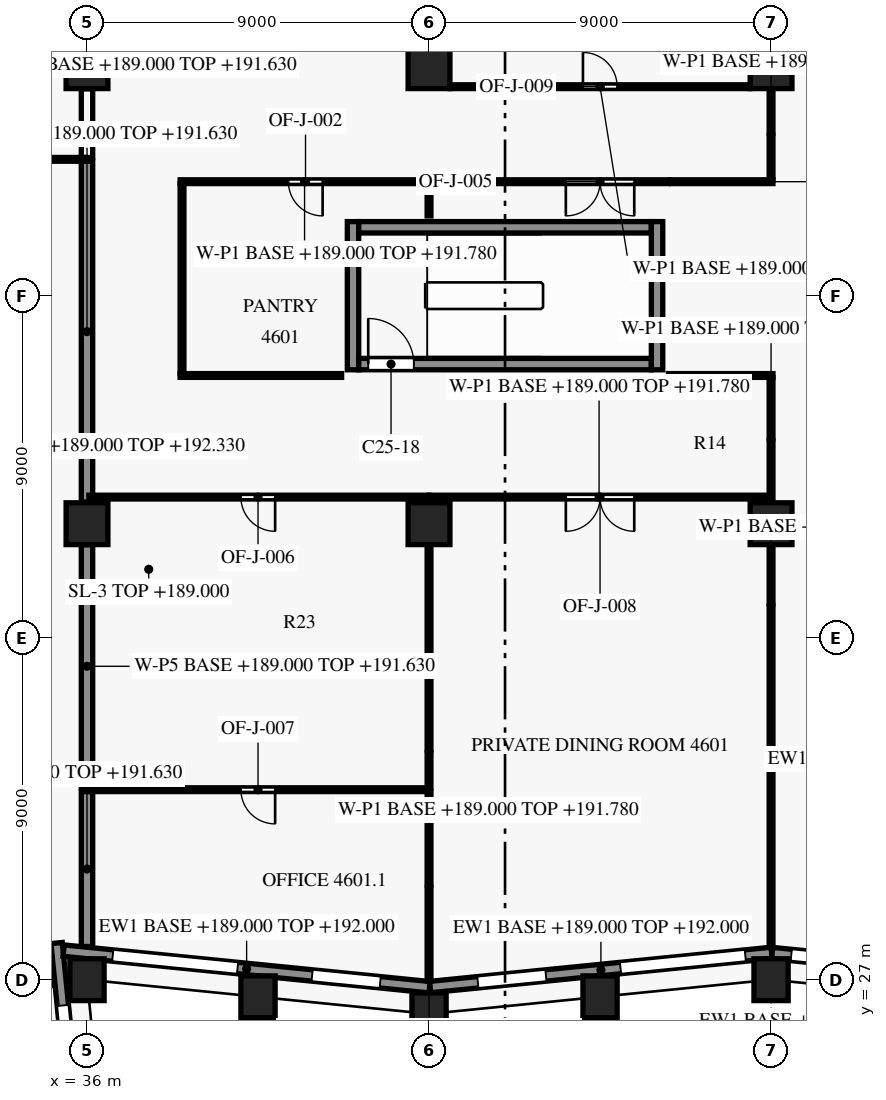
"""IFC4 building model, lengths in metres.
Left out: names, types, materials, properties, quantities, classifications, styles, units other than length and angle.
Written with IfcOpenShell. Run it as: python <this file> out.ifc"""

import sys

from ifc_helpers import new_model, si_unit, direction, frame, frame_2d, origin, origin_2d, place, context, subcontext, project, spatial, rectangle, extrude, element, fill, save


model = new_model("IFC4")
c1 = context("Model", 3, precision=1e-05, world=origin(), true_north=direction((0.0, 1.0)))
c2 = subcontext(c1, "Body", "Model", "MODEL_VIEW")
j1 = project(units=[si_unit("LENGTHUNIT", "METRE"), si_unit("PLANEANGLEUNIT", "RADIAN")], contexts=[c1])
p1 = place(None, origin())
s1 = spatial("IfcSite", under=j1, at=p1, CompositionType="ELEMENT")
p2 = place(p1, origin())
s2 = spatial("IfcBuilding", under=s1, at=p2, CompositionType="ELEMENT")
p3 = place(p2, frame((0.0, 0.0, 189.0)))
s3 = spatial("IfcBuildingStorey", under=s2, at=p3, CompositionType="ELEMENT", Elevation=189.0)
for number, where, z_axis, x_axis in (
    (1, (36.0, 27.0, 0.0), (0.0, 0.0, 1.0), (-0.1, 0.995, 0.0)),
    (2, (40.5, 26.55, 0.0), (0.0, 0.0, 1.0), (0.995, -0.1, 0.0)),
    (3, (45.0, 26.1, 0.0), (0.0, 0.0, 1.0), (1.0, 0.0, 0.0)),
    (4, (49.5, 26.55, 0.0), (0.0, 0.0, 1.0), (0.995, 0.1, 0.0)),
    (5, (54.0, 27.0, 0.0), (0.0, 0.0, 1.0), (1.0, 0.0, 0.0)),
):
    element("IfcColumn", number, at=place(p3, frame(where, z_axis=z_axis, x_axis=x_axis)), inside=s3, PredefinedType="COLUMN", context=c2, shape_type="SweptSolid", body=[
        extrude(rectangle(XDim=0.9, YDim=1.1, at=origin_2d()), origin(), (0.0, 0.0, 1.0), 3.8),
    ])
for number, where, z_axis, x_axis in (
    (6, (36.0, 39.0, 0.0), (0.0, 0.0, 1.0), (1.0, 0.0, 0.0)),
    (7, (36.0, 51.0, 0.0), (0.0, 0.0, 1.0), (1.0, 0.0, 0.0)),
    (8, (45.0, 39.0, 0.0), (0.0, 0.0, 1.0), (1.0, 0.0, 0.0)),
    (9, (45.0, 51.0, 0.0), (0.0, 0.0, 1.0), (1.0, 0.0, 0.0)),
    (10, (54.0, 39.0, 0.0), (0.0, 0.0, 1.0), (1.0, 0.0, 0.0)),
    (11, (54.0, 51.0, 0.0), (0.0, 0.0, 1.0), (1.0, 0.0, 0.0)),
):
    element("IfcColumn", number, at=place(p3, frame(where, z_axis=z_axis, x_axis=x_axis)), inside=s3, PredefinedType="COLUMN", context=c2, shape_type="SweptSolid", body=[
        extrude(rectangle(XDim=1.1, YDim=1.1, at=origin_2d()), origin(), (0.0, 0.0, 1.0), 3.8),
    ])
p4 = place(p3, frame((35.2, 27.964, 0.0), z_axis=(0.0, 0.0, 1.0), x_axis=(0.099501297882, -0.995037432321, 0.0)))
e12 = element("IfcWall", 12, at=p4, inside=s3, PredefinedType="SOLIDWALL", context=c2, shape_type="SweptSolid", body=[
    extrude(rectangle(XDim=9.984, YDim=0.3, at=frame_2d((4.992, 0.0))), origin(), (0.0, 0.0, 1.0), 3.0),
])
p5 = place(p4, frame((1.65, 0.0, 0.15)))
e13 = element("IfcOpeningElement", 13, at=p5, cuts=e12, PredefinedType="OPENING", context=c2, shape_type="SweptSolid", body=[
    extrude(rectangle(XDim=3.3, YDim=2.4, at=frame_2d((1.65, 1.2))), frame((0.0, 0.16, 0.0), z_axis=(0.0, -1.0, 0.0), x_axis=(1.0, 0.0, 0.0)), (0.0, 0.0, 1.0), 0.32),
])
p6 = place(p4, frame((6.923, 0.0, 0.75)))
e14 = element("IfcOpeningElement", 14, at=p6, cuts=e12, PredefinedType="OPENING", context=c2, shape_type="SweptSolid", body=[
    extrude(rectangle(XDim=1.8, YDim=1.8, at=frame_2d((0.9, 0.9))), frame((0.0, 0.16, 0.0), z_axis=(0.0, -1.0, 0.0), x_axis=(1.0, 0.0, 0.0)), (0.0, 0.0, 1.0), 0.32),
])
p7 = place(p3, frame((45.015, 26.802, 0.0), z_axis=(0.0, 0.0, 1.0), x_axis=(-0.995037689759, 0.099498723402, 0.0)))
e15 = element("IfcWall", 15, at=p7, inside=s3, PredefinedType="SOLIDWALL", context=c2, shape_type="SweptSolid", body=[
    extrude(rectangle(XDim=9.677, YDim=0.3, at=frame_2d((4.839, 0.0))), origin(), (0.0, 0.0, 1.0), 3.0),
])
p8 = place(p7, frame((1.306, 0.0, 0.75)))
e16 = element("IfcOpeningElement", 16, at=p8, cuts=e15, PredefinedType="OPENING", context=c2, shape_type="SweptSolid", body=[
    extrude(rectangle(XDim=1.8, YDim=1.8, at=frame_2d((0.9, 0.9))), frame((0.0, 0.16, 0.0), z_axis=(0.0, -1.0, 0.0), x_axis=(1.0, 0.0, 0.0)), (0.0, 0.0, 1.0), 0.32),
])
p9 = place(p7, frame((5.079, 0.0, 0.15)))
e17 = element("IfcOpeningElement", 17, at=p9, cuts=e15, PredefinedType="OPENING", context=c2, shape_type="SweptSolid", body=[
    extrude(rectangle(XDim=3.3, YDim=2.4, at=frame_2d((1.65, 1.2))), frame((0.0, 0.16, 0.0), z_axis=(0.0, -1.0, 0.0), x_axis=(1.0, 0.0, 0.0)), (0.0, 0.0, 1.0), 0.32),
])
p10 = place(p3, frame((54.015, 27.705, 0.0), z_axis=(0.0, 0.0, 1.0), x_axis=(-0.995035316196, -0.099522457379, 0.0)))
e18 = element("IfcWall", 18, at=p10, inside=s3, PredefinedType="SOLIDWALL", context=c2, shape_type="SweptSolid", body=[
    extrude(rectangle(XDim=9.03, YDim=0.3, at=frame_2d((4.515, 0.0))), origin(), (0.0, 0.0, 1.0), 3.0),
])
p11 = place(p10, frame((0.696, 0.0, 0.15)))
e19 = element("IfcOpeningElement", 19, at=p11, cuts=e18, PredefinedType="OPENING", context=c2, shape_type="SweptSolid", body=[
    extrude(rectangle(XDim=3.3, YDim=2.4, at=frame_2d((1.65, 1.2))), frame((0.0, 0.16, 0.0), z_axis=(0.0, -1.0, 0.0), x_axis=(1.0, 0.0, 0.0)), (0.0, 0.0, 1.0), 0.32),
])
p12 = place(p10, frame((5.969, 0.0, 0.75)))
e20 = element("IfcOpeningElement", 20, at=p12, cuts=e18, PredefinedType="OPENING", context=c2, shape_type="SweptSolid", body=[
    extrude(rectangle(XDim=1.8, YDim=1.8, at=frame_2d((0.9, 0.9))), frame((0.0, 0.16, 0.0), z_axis=(0.0, -1.0, 0.0), x_axis=(1.0, 0.0, 0.0)), (0.0, 0.0, 1.0), 0.32),
])
p13 = place(p3, frame((57.965, 27.307, 0.0), z_axis=(0.0, 0.0, 1.0), x_axis=(-0.99503596767, 0.099515943658, 0.0)))
e21 = element("IfcWall", 21, at=p13, inside=s3, PredefinedType="SOLIDWALL", context=c2, shape_type="SweptSolid", body=[
    extrude(rectangle(XDim=3.955, YDim=0.3, at=frame_2d((1.977, 0.0))), origin(), (0.0, 0.0, 1.0), 3.0),
])
p14 = place(p13, frame((0.15, 0.0, 0.15)))
e22 = element("IfcOpeningElement", 22, at=p14, cuts=e21, PredefinedType="OPENING", context=c2, shape_type="SweptSolid", body=[
    extrude(rectangle(XDim=3.3, YDim=2.4, at=frame_2d((1.65, 1.2))), frame((0.0, 0.16, 0.0), z_axis=(0.0, -1.0, 0.0), x_axis=(1.0, 0.0, 0.0)), (0.0, 0.0, 1.0), 0.32),
])
p15 = place(p3, frame((43.15, 43.2, 0.0), z_axis=(0.0, 0.0, 1.0), x_axis=(1.0, 0.0, 0.0)))
e23 = element("IfcWall", 23, at=p15, inside=s3, PredefinedType="SHEAR", context=c2, shape_type="SweptSolid", body=[
    extrude(rectangle(XDim=7.7, YDim=0.3, at=frame_2d((3.85, 0.0))), origin(), (0.0, 0.0, 1.0), 3.5),
])
p16 = place(p15, frame((0.25, 0.0, 0.0)))
e24 = element("IfcOpeningElement", 24, at=p16, cuts=e23, PredefinedType="OPENING", context=c2, shape_type="SweptSolid", body=[
    extrude(rectangle(XDim=1.2, YDim=2.2, at=frame_2d((0.6, 1.1))), frame((0.0, 0.16, 0.0), z_axis=(0.0, -1.0, 0.0), x_axis=(1.0, 0.0, 0.0)), (0.0, 0.0, 1.0), 0.32),
])
p17 = place(p3, frame((43.15, 46.8, 0.0), z_axis=(0.0, 0.0, 1.0), x_axis=(1.0, 0.0, 0.0)))
e25 = element("IfcWall", 25, at=p17, inside=s3, PredefinedType="SHEAR", context=c2, shape_type="SweptSolid", body=[
    extrude(rectangle(XDim=7.7, YDim=0.3, at=frame_2d((3.85, 0.0))), origin(), (0.0, 0.0, 1.0), 3.5),
])
for number, where, z_axis, x_axis in (
    (26, (43.0, 43.05, 0.0), (0.0, 0.0, 1.0), (0.0, 1.0, 0.0)),
    (27, (51.0, 43.05, 0.0), (0.0, 0.0, 1.0), (0.0, 1.0, 0.0)),
):
    element("IfcWall", number, at=place(p3, frame(where, z_axis=z_axis, x_axis=x_axis)), inside=s3, PredefinedType="SHEAR", context=c2, shape_type="SweptSolid", body=[
        extrude(rectangle(XDim=3.9, YDim=0.3, at=frame_2d((1.95, 0.0))), origin(), (0.0, 0.0, 1.0), 3.5),
    ])
p18 = place(p3, frame((24.555, 27.0, 0.0), z_axis=(0.0, 0.0, 1.0), x_axis=(1.0, 0.0, 0.0)))
e28 = element("IfcWall", 28, at=p18, inside=s3, PredefinedType="PARTITIONING", context=c2, shape_type="SweptSolid", body=[
    extrude(rectangle(XDim=10.571, YDim=0.3, at=frame_2d((5.285, 0.0))), origin(), (0.0, 0.0, 1.0), 2.63),
])
p19 = place(p3, frame((54.0, 27.874, 0.0), z_axis=(0.0, 0.0, 1.0), x_axis=(0.0, 1.0, 0.0)))
e29 = element("IfcWall", 29, at=p19, inside=s3, PredefinedType="PARTITIONING", context=c2, shape_type="SweptSolid", body=[
    extrude(rectangle(XDim=10.571, YDim=0.1, at=frame_2d((5.285, 0.0))), origin(), (0.0, 0.0, 1.0), 2.78),
])
p20 = place(p3, frame((36.0, 27.874, 0.0), z_axis=(0.0, 0.0, 1.0), x_axis=(0.0, 1.0, 0.0)))
e30 = element("IfcWall", 30, at=p20, inside=s3, PredefinedType="PARTITIONING", context=c2, shape_type="SweptSolid", body=[
    extrude(rectangle(XDim=4.076, YDim=0.3, at=frame_2d((2.038, 0.0))), origin(), (0.0, 0.0, 1.0), 2.63),
])
p21 = place(p3, frame((45.0, 31.95, 0.0), z_axis=(0.0, 0.0, 1.0), x_axis=(0.0, -1.0, 0.0)))
e31 = element("IfcWall", 31, at=p21, inside=s3, PredefinedType="PARTITIONING", context=c2, shape_type="SweptSolid", body=[
    extrude(rectangle(XDim=4.976, YDim=0.1, at=frame_2d((2.488, 0.0))), origin(), (0.0, 0.0, 1.0), 2.78),
])
p22 = place(p3, frame((44.95, 32.0, 0.0), z_axis=(0.0, 0.0, 1.0), x_axis=(-1.0, 0.0, 0.0)))
e32 = element("IfcWall", 32, at=p22, inside=s3, PredefinedType="PARTITIONING", context=c2, shape_type="SweptSolid", body=[
    extrude(rectangle(XDim=8.9, YDim=0.1, at=frame_2d((4.45, 0.0))), origin(), (0.0, 0.0, 1.0), 2.63),
])
p23 = place(p22, frame((4.0, 0.0, 0.0)))
e33 = element("IfcOpeningElement", 33, at=p23, cuts=e32, PredefinedType="OPENING", context=c2, shape_type="SweptSolid", body=[
    extrude(rectangle(XDim=0.9, YDim=2.1, at=frame_2d((0.45, 1.05))), frame((0.0, 0.06, 0.0), z_axis=(0.0, -1.0, 0.0), x_axis=(1.0, 0.0, 0.0)), (0.0, 0.0, 1.0), 0.12),
])
p24 = place(p3, frame((36.0, 32.05, 0.0), z_axis=(0.0, 0.0, 1.0), x_axis=(0.0, 1.0, 0.0)))
e34 = element("IfcWall", 34, at=p24, inside=s3, PredefinedType="PARTITIONING", context=c2, shape_type="SweptSolid", body=[
    extrude(rectangle(XDim=6.395, YDim=0.3, at=frame_2d((3.198, 0.0))), origin(), (0.0, 0.0, 1.0), 2.63),
])
p25 = place(p3, frame((45.0, 38.445, 0.0), z_axis=(0.0, 0.0, 1.0), x_axis=(0.0, -1.0, 0.0)))
e35 = element("IfcWall", 35, at=p25, inside=s3, PredefinedType="PARTITIONING", context=c2, shape_type="SweptSolid", body=[
    extrude(rectangle(XDim=6.395, YDim=0.1, at=frame_2d((3.198, 0.0))), origin(), (0.0, 0.0, 1.0), 2.78),
])
p26 = place(p3, frame((45.0, 39.7, 0.0), z_axis=(0.0, 0.0, 1.0), x_axis=(-1.0, 0.0, 0.0)))
e36 = element("IfcWall", 36, at=p26, inside=s3, PredefinedType="PARTITIONING", context=c2, shape_type="SweptSolid", body=[
    extrude(rectangle(XDim=8.95, YDim=0.1, at=frame_2d((4.475, 0.0))), origin(), (0.0, 0.0, 1.0), 2.63),
])
p27 = place(p26, frame((4.05, 0.0, 0.0)))
e37 = element("IfcOpeningElement", 37, at=p27, cuts=e36, PredefinedType="OPENING", context=c2, shape_type="SweptSolid", body=[
    extrude(rectangle(XDim=0.9, YDim=2.1, at=frame_2d((0.45, 1.05))), frame((0.0, 0.06, 0.0), z_axis=(0.0, -1.0, 0.0), x_axis=(1.0, 0.0, 0.0)), (0.0, 0.0, 1.0), 0.12),
])
p28 = place(p3, frame((53.95, 39.7, 0.0), z_axis=(0.0, 0.0, 1.0), x_axis=(-1.0, 0.0, 0.0)))
e38 = element("IfcWall", 38, at=p28, inside=s3, PredefinedType="PARTITIONING", context=c2, shape_type="SweptSolid", body=[
    extrude(rectangle(XDim=8.95, YDim=0.1, at=frame_2d((4.475, 0.0))), origin(), (0.0, 0.0, 1.0), 2.78),
])
p29 = place(p28, frame((3.55, 0.0, 0.0)))
e39 = element("IfcOpeningElement", 39, at=p29, cuts=e38, PredefinedType="OPENING", context=c2, shape_type="SweptSolid", body=[
    extrude(rectangle(XDim=1.8, YDim=2.1, at=frame_2d((0.9, 1.05))), frame((0.0, 0.06, 0.0), z_axis=(0.0, -1.0, 0.0), x_axis=(1.0, 0.0, 0.0)), (0.0, 0.0, 1.0), 0.12),
])
p30 = place(p3, frame((36.0, 39.57, 0.0), z_axis=(0.0, 0.0, 1.0), x_axis=(0.0, 1.0, 0.0)))
e40 = element("IfcWall", 40, at=p30, inside=s3, PredefinedType="PARTITIONING", context=c2, shape_type="SweptSolid", body=[
    extrude(rectangle(XDim=8.968, YDim=0.3, at=frame_2d((4.484, 0.0))), origin(), (0.0, 0.0, 1.0), 2.63),
])
p31 = place(p3, frame((54.0, 42.85, 0.0), z_axis=(0.0, 0.0, 1.0), x_axis=(0.0, -1.0, 0.0)))
e41 = element("IfcWall", 41, at=p31, inside=s3, PredefinedType="PARTITIONING", context=c2, shape_type="SweptSolid", body=[
    extrude(rectangle(XDim=3.28, YDim=0.1, at=frame_2d((1.64, 0.0))), origin(), (0.0, 0.0, 1.0), 2.78),
])
p32 = place(p3, frame((38.45, 42.9, 0.0), z_axis=(0.0, 0.0, 1.0), x_axis=(1.0, 0.0, 0.0)))
e42 = element("IfcWall", 42, at=p32, inside=s3, PredefinedType="PARTITIONING", context=c2, shape_type="SweptSolid", body=[
    extrude(rectangle(XDim=4.25, YDim=0.1, at=frame_2d((2.125, 0.0))), origin(), (0.0, 0.0, 1.0), 2.63),
])
p33 = place(p3, frame((51.3, 42.9, 0.0), z_axis=(0.0, 0.0, 1.0), x_axis=(1.0, 0.0, 0.0)))
e43 = element("IfcWall", 43, at=p33, inside=s3, PredefinedType="PARTITIONING", context=c2, shape_type="SweptSolid", body=[
    extrude(rectangle(XDim=2.75, YDim=0.1, at=frame_2d((1.375, 0.0))), origin(), (0.0, 0.0, 1.0), 2.63),
])
p34 = place(p3, frame((38.5, 47.95, 0.0), z_axis=(0.0, 0.0, 1.0), x_axis=(0.0, -1.0, 0.0)))
e44 = element("IfcWall", 44, at=p34, inside=s3, PredefinedType="PARTITIONING", context=c2, shape_type="SweptSolid", body=[
    extrude(rectangle(XDim=5.0, YDim=0.1, at=frame_2d((2.5, 0.0))), origin(), (0.0, 0.0, 1.0), 2.63),
])
p35 = place(p3, frame((45.0, 47.95, 0.0), z_axis=(0.0, 0.0, 1.0), x_axis=(0.0, -1.0, 0.0)))
e45 = element("IfcWall", 45, at=p35, inside=s3, PredefinedType="PARTITIONING", context=c2, shape_type="SweptSolid", body=[
    extrude(rectangle(XDim=0.85, YDim=0.1, at=frame_2d((0.425, 0.0))), origin(), (0.0, 0.0, 1.0), 2.63),
])
p36 = place(p3, frame((45.0, 48.0, 0.0), z_axis=(0.0, 0.0, 1.0), x_axis=(-1.0, 0.0, 0.0)))
e46 = element("IfcWall", 46, at=p36, inside=s3, PredefinedType="PARTITIONING", context=c2, shape_type="SweptSolid", body=[
    extrude(rectangle(XDim=6.55, YDim=0.1, at=frame_2d((3.275, 0.0))), origin(), (0.0, 0.0, 1.0), 2.78),
])
p37 = place(p36, frame((2.8, 0.0, 0.0)))
e47 = element("IfcOpeningElement", 47, at=p37, cuts=e46, PredefinedType="OPENING", context=c2, shape_type="SweptSolid", body=[
    extrude(rectangle(XDim=0.9, YDim=2.1, at=frame_2d((0.45, 1.05))), frame((0.0, 0.06, 0.0), z_axis=(0.0, -1.0, 0.0), x_axis=(1.0, 0.0, 0.0)), (0.0, 0.0, 1.0), 0.12),
])
p38 = place(p3, frame((54.05, 48.0, 0.0), z_axis=(0.0, 0.0, 1.0), x_axis=(-1.0, 0.0, 0.0)))
e48 = element("IfcWall", 48, at=p38, inside=s3, PredefinedType="PARTITIONING", context=c2, shape_type="SweptSolid", body=[
    extrude(rectangle(XDim=9.05, YDim=0.1, at=frame_2d((4.525, 0.0))), origin(), (0.0, 0.0, 1.0), 2.78),
])
p39 = place(p38, frame((3.65, 0.0, 0.0)))
e49 = element("IfcOpeningElement", 49, at=p39, cuts=e48, PredefinedType="OPENING", context=c2, shape_type="SweptSolid", body=[
    extrude(rectangle(XDim=1.8, YDim=2.1, at=frame_2d((0.9, 1.05))), frame((0.0, 0.06, 0.0), z_axis=(0.0, -1.0, 0.0), x_axis=(1.0, 0.0, 0.0)), (0.0, 0.0, 1.0), 0.12),
])
p40 = place(p3, frame((31.05, 48.588, 0.0), z_axis=(0.0, 0.0, 1.0), x_axis=(1.0, 0.0, 0.0)))
e50 = element("IfcWall", 50, at=p40, inside=s3, PredefinedType="PARTITIONING", context=c2, shape_type="SweptSolid", body=[
    extrude(rectangle(XDim=4.9, YDim=0.1, at=frame_2d((2.45, 0.0))), origin(), (0.0, 0.0, 1.0), 2.63),
])
p41 = place(p3, frame((36.0, 48.638, 0.0), z_axis=(0.0, 0.0, 1.0), x_axis=(0.0, 1.0, 0.0)))
e51 = element("IfcWall", 51, at=p41, inside=s3, PredefinedType="PARTITIONING", context=c2, shape_type="SweptSolid", body=[
    extrude(rectangle(XDim=1.807, YDim=0.3, at=frame_2d((0.904, 0.0))), origin(), (0.0, 0.0, 1.0), 2.63),
])
p42 = place(p3, frame((54.0, 50.445, 0.0), z_axis=(0.0, 0.0, 1.0), x_axis=(0.0, -1.0, 0.0)))
e52 = element("IfcWall", 52, at=p42, inside=s3, PredefinedType="PARTITIONING", context=c2, shape_type="SweptSolid", body=[
    extrude(rectangle(XDim=2.395, YDim=0.1, at=frame_2d((1.198, 0.0))), origin(), (0.0, 0.0, 1.0), 2.78),
])
p43 = place(p3, frame((45.555, 50.5, 0.0), z_axis=(0.0, 0.0, 1.0), x_axis=(1.0, 0.0, 0.0)))
e53 = element("IfcWall", 53, at=p43, inside=s3, PredefinedType="PARTITIONING", context=c2, shape_type="SweptSolid", body=[
    extrude(rectangle(XDim=7.89, YDim=0.1, at=frame_2d((3.945, 0.0))), origin(), (0.0, 0.0, 1.0), 3.33),
])
p44 = place(p43, frame((3.495, 0.0, 0.0)))
e54 = element("IfcOpeningElement", 54, at=p44, cuts=e53, PredefinedType="OPENING", context=c2, shape_type="SweptSolid", body=[
    extrude(rectangle(XDim=0.9, YDim=2.1, at=frame_2d((0.45, 1.05))), frame((0.0, 0.06, 0.0), z_axis=(0.0, -1.0, 0.0), x_axis=(1.0, 0.0, 0.0)), (0.0, 0.0, 1.0), 0.12),
])
p45 = place(p5, origin())
e55 = element("IfcWindow", 55, at=p45, inside=s3, PartitioningType="SINGLE_PANEL", PredefinedType="WINDOW", context=c2, shape_type="SweptSolid", body=[
    extrude(rectangle(XDim=3.3, YDim=2.4, at=frame_2d((1.65, 1.2))), frame((0.0, 0.03, 0.0), z_axis=(0.0, -1.0, 0.0), x_axis=(1.0, 0.0, 0.0)), (0.0, 0.0, 1.0), 0.06),
])
fill(e13, e55)
p46 = place(p8, origin())
e56 = element("IfcWindow", 56, at=p46, inside=s3, PartitioningType="SINGLE_PANEL", PredefinedType="WINDOW", context=c2, shape_type="SweptSolid", body=[
    extrude(rectangle(XDim=1.8, YDim=1.8, at=frame_2d((0.9, 0.9))), frame((0.0, 0.03, 0.0), z_axis=(0.0, -1.0, 0.0), x_axis=(1.0, 0.0, 0.0)), (0.0, 0.0, 1.0), 0.06),
])
fill(e16, e56)
p47 = place(p9, origin())
e57 = element("IfcWindow", 57, at=p47, inside=s3, PartitioningType="SINGLE_PANEL", PredefinedType="WINDOW", context=c2, shape_type="SweptSolid", body=[
    extrude(rectangle(XDim=3.3, YDim=2.4, at=frame_2d((1.65, 1.2))), frame((0.0, 0.03, 0.0), z_axis=(0.0, -1.0, 0.0), x_axis=(1.0, 0.0, 0.0)), (0.0, 0.0, 1.0), 0.06),
])
fill(e17, e57)
p48 = place(p11, origin())
e58 = element("IfcWindow", 58, at=p48, inside=s3, PartitioningType="SINGLE_PANEL", PredefinedType="WINDOW", context=c2, shape_type="SweptSolid", body=[
    extrude(rectangle(XDim=3.3, YDim=2.4, at=frame_2d((1.65, 1.2))), frame((0.0, 0.03, 0.0), z_axis=(0.0, -1.0, 0.0), x_axis=(1.0, 0.0, 0.0)), (0.0, 0.0, 1.0), 0.06),
])
fill(e19, e58)
p49 = place(p12, origin())
e59 = element("IfcWindow", 59, at=p49, inside=s3, PartitioningType="SINGLE_PANEL", PredefinedType="WINDOW", context=c2, shape_type="SweptSolid", body=[
    extrude(rectangle(XDim=1.8, YDim=1.8, at=frame_2d((0.9, 0.9))), frame((0.0, 0.03, 0.0), z_axis=(0.0, -1.0, 0.0), x_axis=(1.0, 0.0, 0.0)), (0.0, 0.0, 1.0), 0.06),
])
fill(e20, e59)
p50 = place(p14, origin())
e60 = element("IfcWindow", 60, at=p50, inside=s3, PartitioningType="SINGLE_PANEL", PredefinedType="WINDOW", context=c2, shape_type="SweptSolid", body=[
    extrude(rectangle(XDim=3.3, YDim=2.4, at=frame_2d((1.65, 1.2))), frame((0.0, 0.03, 0.0), z_axis=(0.0, -1.0, 0.0), x_axis=(1.0, 0.0, 0.0)), (0.0, 0.0, 1.0), 0.06),
])
fill(e22, e60)
p51 = place(p16, origin())
e61 = element("IfcDoor", 61, at=p51, inside=s3, OperationType="SINGLE_SWING_RIGHT", PredefinedType="DOOR", context=c2, shape_type="SweptSolid", body=[
    extrude(rectangle(XDim=1.2, YDim=2.2, at=frame_2d((0.6, 1.1))), frame((0.0, 0.025, 0.0), z_axis=(0.0, -1.0, 0.0), x_axis=(1.0, 0.0, 0.0)), (0.0, 0.0, 1.0), 0.05),
])
fill(e24, e61)
p52 = place(p37, origin())
e62 = element("IfcDoor", 62, at=p52, inside=s3, OperationType="SINGLE_SWING_RIGHT", PredefinedType="DOOR", context=c2, shape_type="SweptSolid", body=[
    extrude(rectangle(XDim=0.9, YDim=2.1, at=frame_2d((0.45, 1.05))), frame((0.0, 0.025, 0.0), z_axis=(0.0, -1.0, 0.0), x_axis=(1.0, 0.0, 0.0)), (0.0, 0.0, 1.0), 0.05),
])
fill(e47, e62)
p53 = place(p39, origin())
e63 = element("IfcDoor", 63, at=p53, inside=s3, OperationType="DOUBLE_DOOR_SINGLE_SWING", PredefinedType="DOOR", context=c2, shape_type="SweptSolid", body=[
    extrude(rectangle(XDim=1.8, YDim=2.1, at=frame_2d((0.9, 1.05))), frame((0.0, 0.025, 0.0), z_axis=(0.0, -1.0, 0.0), x_axis=(1.0, 0.0, 0.0)), (0.0, 0.0, 1.0), 0.05),
])
fill(e49, e63)
p54 = place(p27, origin())
e64 = element("IfcDoor", 64, at=p54, inside=s3, OperationType="SINGLE_SWING_LEFT", PredefinedType="DOOR", context=c2, shape_type="SweptSolid", body=[
    extrude(rectangle(XDim=0.9, YDim=2.1, at=frame_2d((0.45, 1.05))), frame((0.0, 0.025, 0.0), z_axis=(0.0, -1.0, 0.0), x_axis=(1.0, 0.0, 0.0)), (0.0, 0.0, 1.0), 0.05),
])
fill(e37, e64)
p55 = place(p23, origin())
e65 = element("IfcDoor", 65, at=p55, inside=s3, OperationType="SINGLE_SWING_LEFT", PredefinedType="DOOR", context=c2, shape_type="SweptSolid", body=[
    extrude(rectangle(XDim=0.9, YDim=2.1, at=frame_2d((0.45, 1.05))), frame((0.0, 0.025, 0.0), z_axis=(0.0, -1.0, 0.0), x_axis=(1.0, 0.0, 0.0)), (0.0, 0.0, 1.0), 0.05),
])
fill(e33, e65)
p56 = place(p29, origin())
e66 = element("IfcDoor", 66, at=p56, inside=s3, OperationType="DOUBLE_DOOR_SINGLE_SWING", PredefinedType="DOOR", context=c2, shape_type="SweptSolid", body=[
    extrude(rectangle(XDim=1.8, YDim=2.1, at=frame_2d((0.9, 1.05))), frame((0.0, 0.025, 0.0), z_axis=(0.0, -1.0, 0.0), x_axis=(1.0, 0.0, 0.0)), (0.0, 0.0, 1.0), 0.05),
])
fill(e39, e66)
p57 = place(p44, origin())
e67 = element("IfcDoor", 67, at=p57, inside=s3, OperationType="SINGLE_SWING_LEFT", PredefinedType="DOOR", context=c2, shape_type="SweptSolid", body=[
    extrude(rectangle(XDim=0.9, YDim=2.1, at=frame_2d((0.45, 1.05))), frame((0.0, 0.025, 0.0), z_axis=(0.0, -1.0, 0.0), x_axis=(1.0, 0.0, 0.0)), (0.0, 0.0, 1.0), 0.05),
])
fill(e54, e67)
save(model, sys.argv[1])
